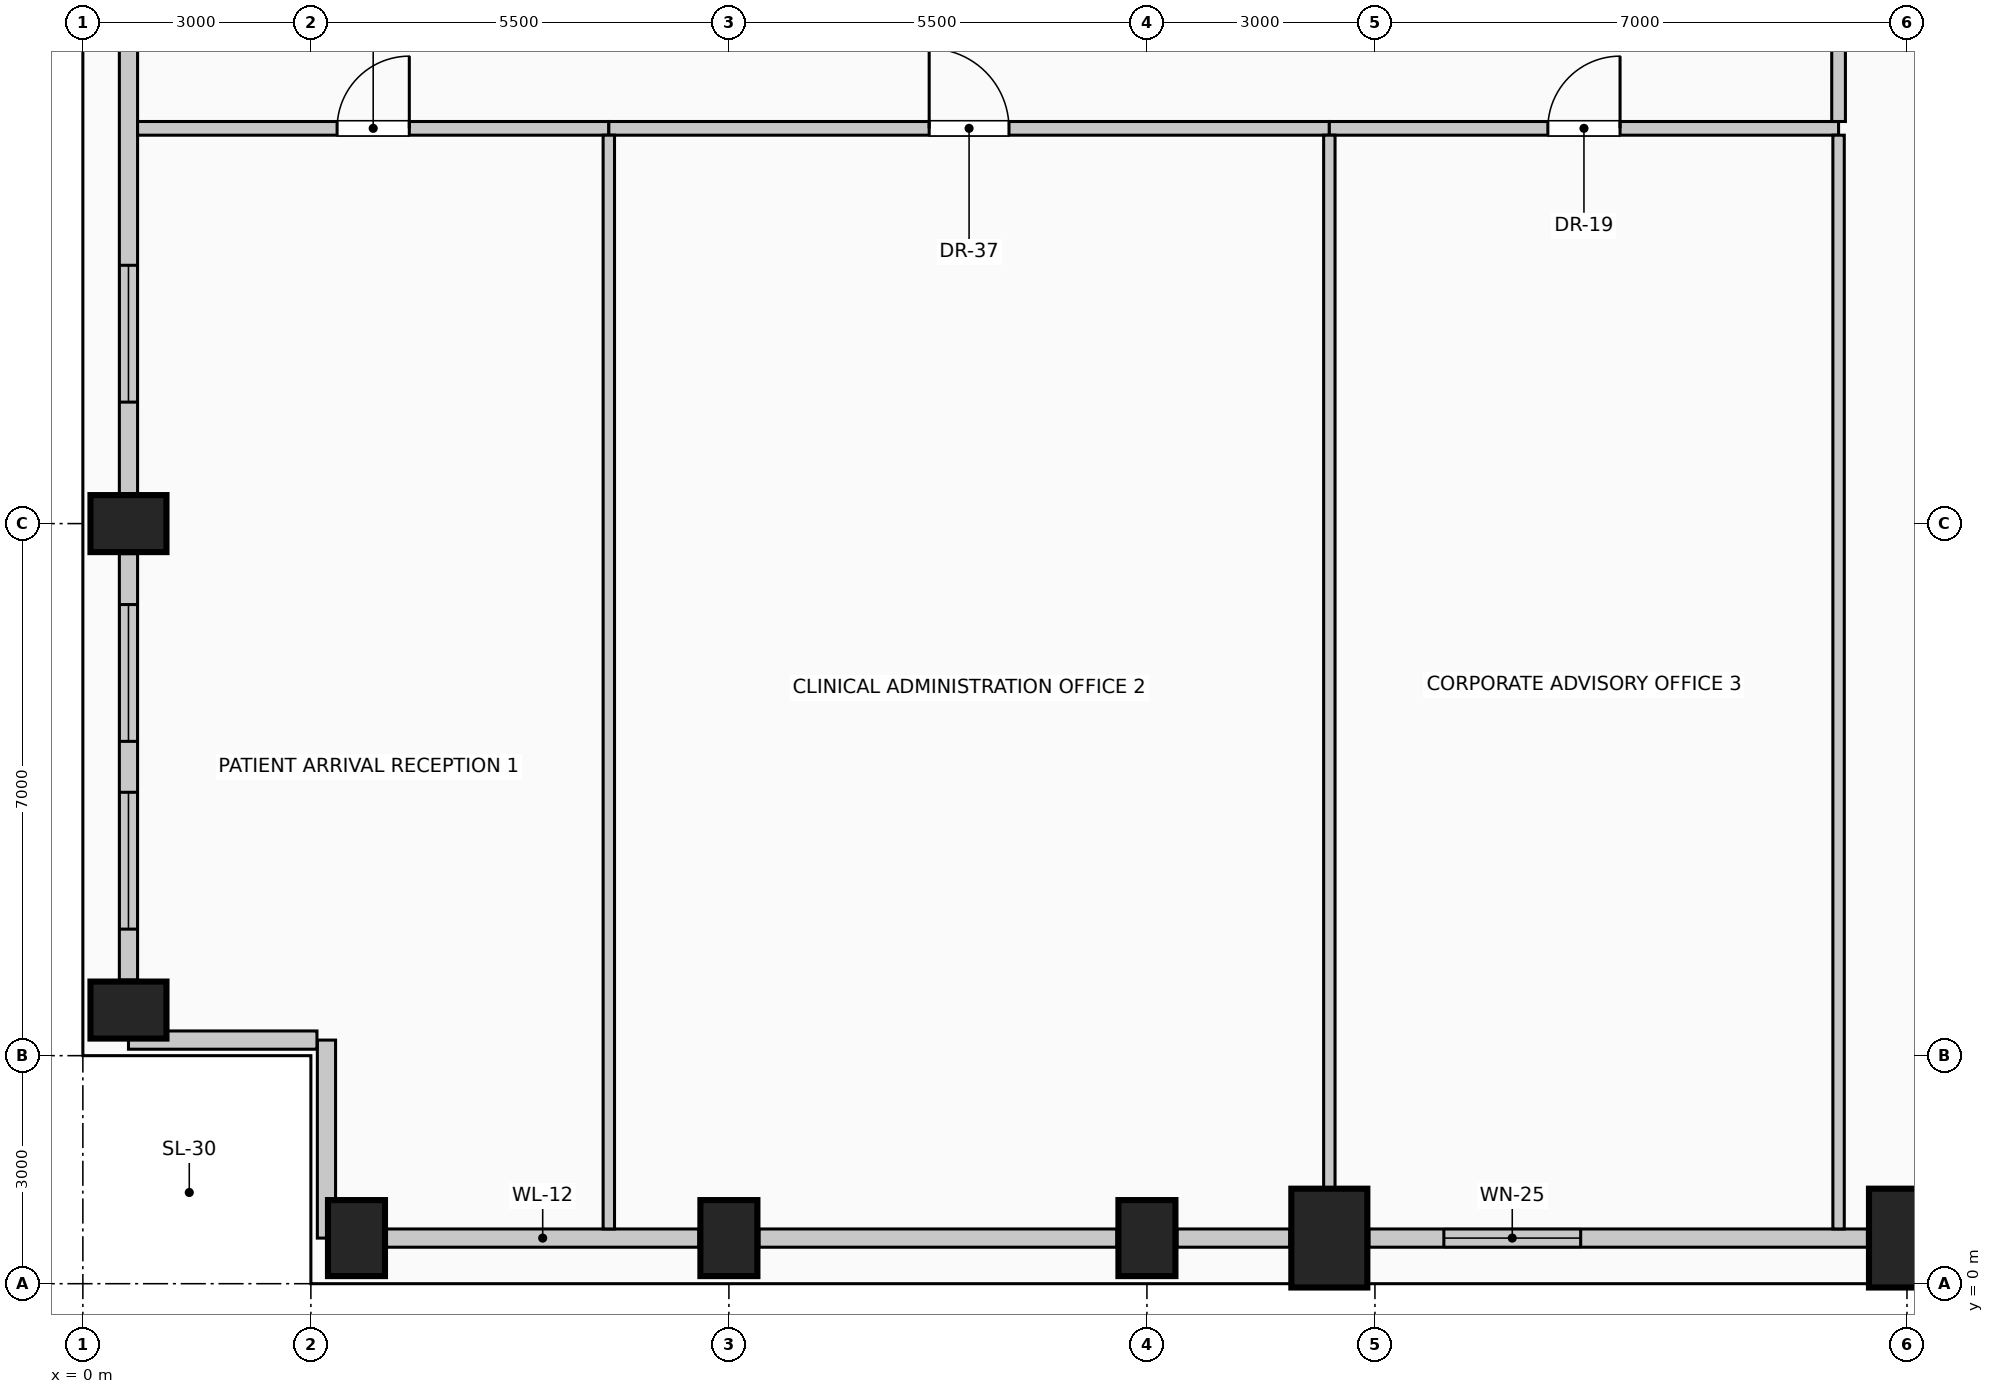
"""IFC4 building model, lengths in metres.
Left out: names, types, materials, properties, quantities, classifications, styles, units other than length and angle.
Written with IfcOpenShell. Run it as: python <this file> out.ifc"""

import sys

from ifc_helpers import new_model, si_unit, direction, frame, frame_2d, origin, origin_2d, place, context, subcontext, project, spatial, rectangle, extrude, element, fill, save


model = new_model("IFC4")
c1 = context("Model", 3, precision=1e-05, world=origin(), true_north=direction((0.0, 1.0)))
c2 = subcontext(c1, "Body", "Model", "MODEL_VIEW")
j1 = project(units=[si_unit("LENGTHUNIT", "METRE"), si_unit("PLANEANGLEUNIT", "RADIAN")], contexts=[c1])
p1 = place(None, origin())
s1 = spatial("IfcSite", under=j1, at=p1, CompositionType="ELEMENT")
p2 = place(p1, origin())
s2 = spatial("IfcBuilding", under=s1, at=p2, CompositionType="ELEMENT")
p3 = place(p2, frame((0.0, 0.0, 264.6)))
s3 = spatial("IfcBuildingStorey", under=s2, at=p3, CompositionType="ELEMENT", Elevation=264.6)
for number, where, z_axis, x_axis in (
    (1, (3.6, 0.6, 0.0), (0.0, 0.0, 1.0), (1.0, 0.0, 0.0)),
    (2, (8.5, 0.6, 0.0), (0.0, 0.0, 1.0), (1.0, 0.0, 0.0)),
    (3, (14.0, 0.6, 0.0), (0.0, 0.0, 1.0), (1.0, 0.0, 0.0)),
):
    element("IfcColumn", number, at=place(p3, frame(where, z_axis=z_axis, x_axis=x_axis)), inside=s3, PredefinedType="COLUMN", context=c2, shape_type="SweptSolid", body=[
        extrude(rectangle(XDim=0.75, YDim=1.0, at=origin_2d()), origin(), (0.0, 0.0, 1.0), 4.0),
    ])
for number, where, z_axis, x_axis in (
    (4, (16.4, 0.6, 0.0), (0.0, 0.0, 1.0), (1.0, 0.0, 0.0)),
    (5, (24.0, 0.6, 0.0), (0.0, 0.0, 1.0), (1.0, 0.0, 0.0)),
):
    element("IfcColumn", number, at=place(p3, frame(where, z_axis=z_axis, x_axis=x_axis)), inside=s3, PredefinedType="COLUMN", context=c2, shape_type="SweptSolid", body=[
        extrude(rectangle(XDim=1.0, YDim=1.3, at=origin_2d()), origin(), (0.0, 0.0, 1.0), 4.0),
    ])
for number, where, z_axis, x_axis in (
    (6, (0.6, 3.6, 0.0), (0.0, 0.0, 1.0), (0.0, 1.0, 0.0)),
    (7, (0.6, 10.0, 0.0), (0.0, 0.0, 1.0), (0.0, 1.0, 0.0)),
):
    element("IfcColumn", number, at=place(p3, frame(where, z_axis=z_axis, x_axis=x_axis)), inside=s3, PredefinedType="COLUMN", context=c2, shape_type="SweptSolid", body=[
        extrude(rectangle(XDim=0.75, YDim=1.0, at=origin_2d()), origin(), (0.0, 0.0, 1.0), 4.0),
    ])
p4 = place(p3, frame((8.105, 0.6, 0.0), z_axis=(0.0, 0.0, 1.0), x_axis=(-1.0, 0.0, 0.0)))
e8 = element("IfcWall", 8, at=p4, inside=s3, PredefinedType="SOLIDWALL", context=c2, shape_type="SweptSolid", body=[
    extrude(rectangle(XDim=4.11, YDim=0.24, at=frame_2d((2.055, 0.0))), origin(), (0.0, 0.0, 1.0), 3.0),
])
p5 = place(p3, frame((13.605, 0.6, 0.0), z_axis=(0.0, 0.0, 1.0), x_axis=(-1.0, 0.0, 0.0)))
e9 = element("IfcWall", 9, at=p5, inside=s3, PredefinedType="SOLIDWALL", context=c2, shape_type="SweptSolid", body=[
    extrude(rectangle(XDim=4.71, YDim=0.24, at=frame_2d((2.355, 0.0))), origin(), (0.0, 0.0, 1.0), 3.0),
])
p6 = place(p3, frame((15.88, 0.6, 0.0), z_axis=(0.0, 0.0, 1.0), x_axis=(-1.0, 0.0, 0.0)))
e10 = element("IfcWall", 10, at=p6, inside=s3, PredefinedType="SOLIDWALL", context=c2, shape_type="SweptSolid", body=[
    extrude(rectangle(XDim=1.485, YDim=0.24, at=frame_2d((0.742, 0.0))), origin(), (0.0, 0.0, 1.0), 3.0),
])
p7 = place(p3, frame((23.48, 0.6, 0.0), z_axis=(0.0, 0.0, 1.0), x_axis=(-1.0, 0.0, 0.0)))
e11 = element("IfcWall", 11, at=p7, inside=s3, PredefinedType="SOLIDWALL", context=c2, shape_type="SweptSolid", body=[
    extrude(rectangle(XDim=6.56, YDim=0.24, at=frame_2d((3.28, 0.0))), origin(), (0.0, 0.0, 1.0), 3.0),
])
p8 = place(p7, frame((3.773, 0.0, 0.42)))
e12 = element("IfcOpeningElement", 12, at=p8, cuts=e11, PredefinedType="OPENING", context=c2, shape_type="SweptSolid", body=[
    extrude(rectangle(XDim=1.8, YDim=2.2, at=frame_2d((0.9, 1.1))), frame((0.0, 0.13, 0.0), z_axis=(0.0, -1.0, 0.0), x_axis=(1.0, 0.0, 0.0)), (0.0, 0.0, 1.0), 0.26),
])
p9 = place(p3, frame((0.6, 3.995, 0.0), z_axis=(0.0, 0.0, 1.0), x_axis=(0.0, 1.0, 0.0)))
e13 = element("IfcWall", 13, at=p9, inside=s3, PredefinedType="SOLIDWALL", context=c2, shape_type="SweptSolid", body=[
    extrude(rectangle(XDim=5.61, YDim=0.24, at=frame_2d((2.805, 0.0))), origin(), (0.0, 0.0, 1.0), 3.0),
])
p10 = place(p9, frame((0.67, 0.0, 0.42)))
e14 = element("IfcOpeningElement", 14, at=p10, cuts=e13, PredefinedType="OPENING", context=c2, shape_type="SweptSolid", body=[
    extrude(rectangle(XDim=1.8, YDim=2.2, at=frame_2d((0.9, 1.1))), frame((0.0, 0.13, 0.0), z_axis=(0.0, -1.0, 0.0), x_axis=(1.0, 0.0, 0.0)), (0.0, 0.0, 1.0), 0.26),
])
p11 = place(p9, frame((3.14, 0.0, 0.42)))
e15 = element("IfcOpeningElement", 15, at=p11, cuts=e13, PredefinedType="OPENING", context=c2, shape_type="SweptSolid", body=[
    extrude(rectangle(XDim=1.8, YDim=2.2, at=frame_2d((0.9, 1.1))), frame((0.0, 0.13, 0.0), z_axis=(0.0, -1.0, 0.0), x_axis=(1.0, 0.0, 0.0)), (0.0, 0.0, 1.0), 0.26),
])
p12 = place(p3, frame((0.6, 10.395, 0.0), z_axis=(0.0, 0.0, 1.0), x_axis=(0.0, 1.0, 0.0)))
e16 = element("IfcWall", 16, at=p12, inside=s3, PredefinedType="SOLIDWALL", context=c2, shape_type="SweptSolid", body=[
    extrude(rectangle(XDim=7.21, YDim=0.24, at=frame_2d((3.605, 0.0))), origin(), (0.0, 0.0, 1.0), 3.0),
])
p13 = place(p12, frame((1.203, 0.0, 0.42)))
e17 = element("IfcOpeningElement", 17, at=p13, cuts=e16, PredefinedType="OPENING", context=c2, shape_type="SweptSolid", body=[
    extrude(rectangle(XDim=1.8, YDim=2.2, at=frame_2d((0.9, 1.1))), frame((0.0, 0.13, 0.0), z_axis=(0.0, -1.0, 0.0), x_axis=(1.0, 0.0, 0.0)), (0.0, 0.0, 1.0), 0.26),
])
p14 = place(p3, frame((3.205, 0.6, 0.0), z_axis=(0.0, 0.0, 1.0), x_axis=(0.0, 1.0, 0.0)))
e18 = element("IfcWall", 18, at=p14, inside=s3, PredefinedType="SOLIDWALL", context=c2, shape_type="SweptSolid", body=[
    extrude(rectangle(XDim=2.605, YDim=0.24, at=frame_2d((1.302, 0.0))), origin(), (0.0, 0.0, 1.0), 3.75),
])
p15 = place(p3, frame((3.08, 3.205, 0.0), z_axis=(0.0, 0.0, 1.0), x_axis=(-1.0, 0.0, 0.0)))
e19 = element("IfcWall", 19, at=p15, inside=s3, PredefinedType="SOLIDWALL", context=c2, shape_type="SweptSolid", body=[
    extrude(rectangle(XDim=2.48, YDim=0.24, at=frame_2d((1.24, 0.0))), origin(), (0.0, 0.0, 1.0), 3.75),
])
p16 = place(p3, frame((0.72, 15.2, 0.0), z_axis=(0.0, 0.0, 1.0), x_axis=(1.0, 0.0, 0.0)))
e20 = element("IfcWall", 20, at=p16, inside=s3, PredefinedType="PARTITIONING", context=c2, shape_type="SweptSolid", body=[
    extrude(rectangle(XDim=6.2, YDim=0.18, at=frame_2d((3.1, 0.0))), origin(), (0.0, 0.0, 1.0), 3.75),
])
p17 = place(p16, frame((2.625, 0.0, 0.0)))
e21 = element("IfcOpeningElement", 21, at=p17, cuts=e20, PredefinedType="OPENING", context=c2, shape_type="SweptSolid", body=[
    extrude(rectangle(XDim=0.95, YDim=2.15, at=frame_2d((0.475, 1.075))), frame((0.0, 0.1, 0.0), z_axis=(0.0, -1.0, 0.0), x_axis=(1.0, 0.0, 0.0)), (0.0, 0.0, 1.0), 0.2),
])
p18 = place(p3, frame((6.92, 15.2, 0.0), z_axis=(0.0, 0.0, 1.0), x_axis=(1.0, 0.0, 0.0)))
e22 = element("IfcWall", 22, at=p18, inside=s3, PredefinedType="PARTITIONING", context=c2, shape_type="SweptSolid", body=[
    extrude(rectangle(XDim=9.48, YDim=0.18, at=frame_2d((4.74, 0.0))), origin(), (0.0, 0.0, 1.0), 3.75),
])
p19 = place(p18, frame((4.215, 0.0, 0.0)))
e23 = element("IfcOpeningElement", 23, at=p19, cuts=e22, PredefinedType="OPENING", context=c2, shape_type="SweptSolid", body=[
    extrude(rectangle(XDim=1.05, YDim=2.15, at=frame_2d((0.525, 1.075))), frame((0.0, 0.1, 0.0), z_axis=(0.0, -1.0, 0.0), x_axis=(1.0, 0.0, 0.0)), (0.0, 0.0, 1.0), 0.2),
])
p20 = place(p3, frame((16.4, 15.2, 0.0), z_axis=(0.0, 0.0, 1.0), x_axis=(1.0, 0.0, 0.0)))
e24 = element("IfcWall", 24, at=p20, inside=s3, PredefinedType="PARTITIONING", context=c2, shape_type="SweptSolid", body=[
    extrude(rectangle(XDim=6.7, YDim=0.18, at=frame_2d((3.35, 0.0))), origin(), (0.0, 0.0, 1.0), 3.75),
])
p21 = place(p20, frame((2.875, 0.0, 0.0)))
e25 = element("IfcOpeningElement", 25, at=p21, cuts=e24, PredefinedType="OPENING", context=c2, shape_type="SweptSolid", body=[
    extrude(rectangle(XDim=0.95, YDim=2.15, at=frame_2d((0.475, 1.075))), frame((0.0, 0.1, 0.0), z_axis=(0.0, -1.0, 0.0), x_axis=(1.0, 0.0, 0.0)), (0.0, 0.0, 1.0), 0.2),
])
p22 = place(p3, frame((6.92, 0.72, 0.0), z_axis=(0.0, 0.0, 1.0), x_axis=(0.0, 1.0, 0.0)))
e26 = element("IfcWall", 26, at=p22, inside=s3, PredefinedType="PARTITIONING", context=c2, shape_type="SweptSolid", body=[
    extrude(rectangle(XDim=14.39, YDim=0.15, at=frame_2d((7.195, 0.0))), origin(), (0.0, 0.0, 1.0), 3.75),
])
p23 = place(p3, frame((16.4, 1.25, 0.0), z_axis=(0.0, 0.0, 1.0), x_axis=(0.0, 1.0, 0.0)))
e27 = element("IfcWall", 27, at=p23, inside=s3, PredefinedType="PARTITIONING", context=c2, shape_type="SweptSolid", body=[
    extrude(rectangle(XDim=13.86, YDim=0.15, at=frame_2d((6.93, 0.0))), origin(), (0.0, 0.0, 1.0), 3.195),
])
p24 = place(p3, frame((23.1, 0.72, 0.0), z_axis=(0.0, 0.0, 1.0), x_axis=(0.0, 1.0, 0.0)))
e28 = element("IfcWall", 28, at=p24, inside=s3, PredefinedType="PARTITIONING", context=c2, shape_type="SweptSolid", body=[
    extrude(rectangle(XDim=14.39, YDim=0.15, at=frame_2d((7.195, 0.0))), origin(), (0.0, 0.0, 1.0), 3.75),
])
p25 = place(p3, frame((23.1, 15.29, 0.0), z_axis=(0.0, 0.0, 1.0), x_axis=(0.0, 1.0, 0.0)))
e29 = element("IfcWall", 29, at=p25, inside=s3, PredefinedType="PARTITIONING", context=c2, shape_type="SweptSolid", body=[
    extrude(rectangle(XDim=2.01, YDim=0.18, at=frame_2d((1.005, 0.0))), origin(), (0.0, 0.0, 1.0), 3.75),
])
p26 = place(p8, origin())
e30 = element("IfcWindow", 30, at=p26, inside=s3, PartitioningType="SINGLE_PANEL", PredefinedType="WINDOW", context=c2, shape_type="SweptSolid", body=[
    extrude(rectangle(XDim=1.8, YDim=2.2, at=frame_2d((0.9, 1.1))), frame((0.0, 0.03, 0.0), z_axis=(0.0, -1.0, 0.0), x_axis=(1.0, 0.0, 0.0)), (0.0, 0.0, 1.0), 0.06),
])
fill(e12, e30)
p27 = place(p10, origin())
e31 = element("IfcWindow", 31, at=p27, inside=s3, PartitioningType="SINGLE_PANEL", PredefinedType="WINDOW", context=c2, shape_type="SweptSolid", body=[
    extrude(rectangle(XDim=1.8, YDim=2.2, at=frame_2d((0.9, 1.1))), frame((0.0, 0.03, 0.0), z_axis=(0.0, -1.0, 0.0), x_axis=(1.0, 0.0, 0.0)), (0.0, 0.0, 1.0), 0.06),
])
fill(e14, e31)
p28 = place(p11, origin())
e32 = element("IfcWindow", 32, at=p28, inside=s3, PartitioningType="SINGLE_PANEL", PredefinedType="WINDOW", context=c2, shape_type="SweptSolid", body=[
    extrude(rectangle(XDim=1.8, YDim=2.2, at=frame_2d((0.9, 1.1))), frame((0.0, 0.03, 0.0), z_axis=(0.0, -1.0, 0.0), x_axis=(1.0, 0.0, 0.0)), (0.0, 0.0, 1.0), 0.06),
])
fill(e15, e32)
p29 = place(p13, origin())
e33 = element("IfcWindow", 33, at=p29, inside=s3, PartitioningType="SINGLE_PANEL", PredefinedType="WINDOW", context=c2, shape_type="SweptSolid", body=[
    extrude(rectangle(XDim=1.8, YDim=2.2, at=frame_2d((0.9, 1.1))), frame((0.0, 0.03, 0.0), z_axis=(0.0, -1.0, 0.0), x_axis=(1.0, 0.0, 0.0)), (0.0, 0.0, 1.0), 0.06),
])
fill(e17, e33)
p30 = place(p17, origin())
e34 = element("IfcDoor", 34, at=p30, inside=s3, OperationType="SINGLE_SWING_RIGHT", PredefinedType="DOOR", context=c2, shape_type="SweptSolid", body=[
    extrude(rectangle(XDim=0.95, YDim=2.15, at=frame_2d((0.475, 1.075))), frame((0.0, 0.025, 0.0), z_axis=(0.0, -1.0, 0.0), x_axis=(1.0, 0.0, 0.0)), (0.0, 0.0, 1.0), 0.05),
])
fill(e21, e34)
p31 = place(p19, origin())
e35 = element("IfcDoor", 35, at=p31, inside=s3, OperationType="SINGLE_SWING_LEFT", PredefinedType="DOOR", context=c2, shape_type="SweptSolid", body=[
    extrude(rectangle(XDim=1.05, YDim=2.15, at=frame_2d((0.525, 1.075))), frame((0.0, 0.025, 0.0), z_axis=(0.0, -1.0, 0.0), x_axis=(1.0, 0.0, 0.0)), (0.0, 0.0, 1.0), 0.05),
])
fill(e23, e35)
p32 = place(p21, origin())
e36 = element("IfcDoor", 36, at=p32, inside=s3, OperationType="SINGLE_SWING_RIGHT", PredefinedType="DOOR", context=c2, shape_type="SweptSolid", body=[
    extrude(rectangle(XDim=0.95, YDim=2.15, at=frame_2d((0.475, 1.075))), frame((0.0, 0.025, 0.0), z_axis=(0.0, -1.0, 0.0), x_axis=(1.0, 0.0, 0.0)), (0.0, 0.0, 1.0), 0.05),
])
fill(e25, e36)
save(model, sys.argv[1])
